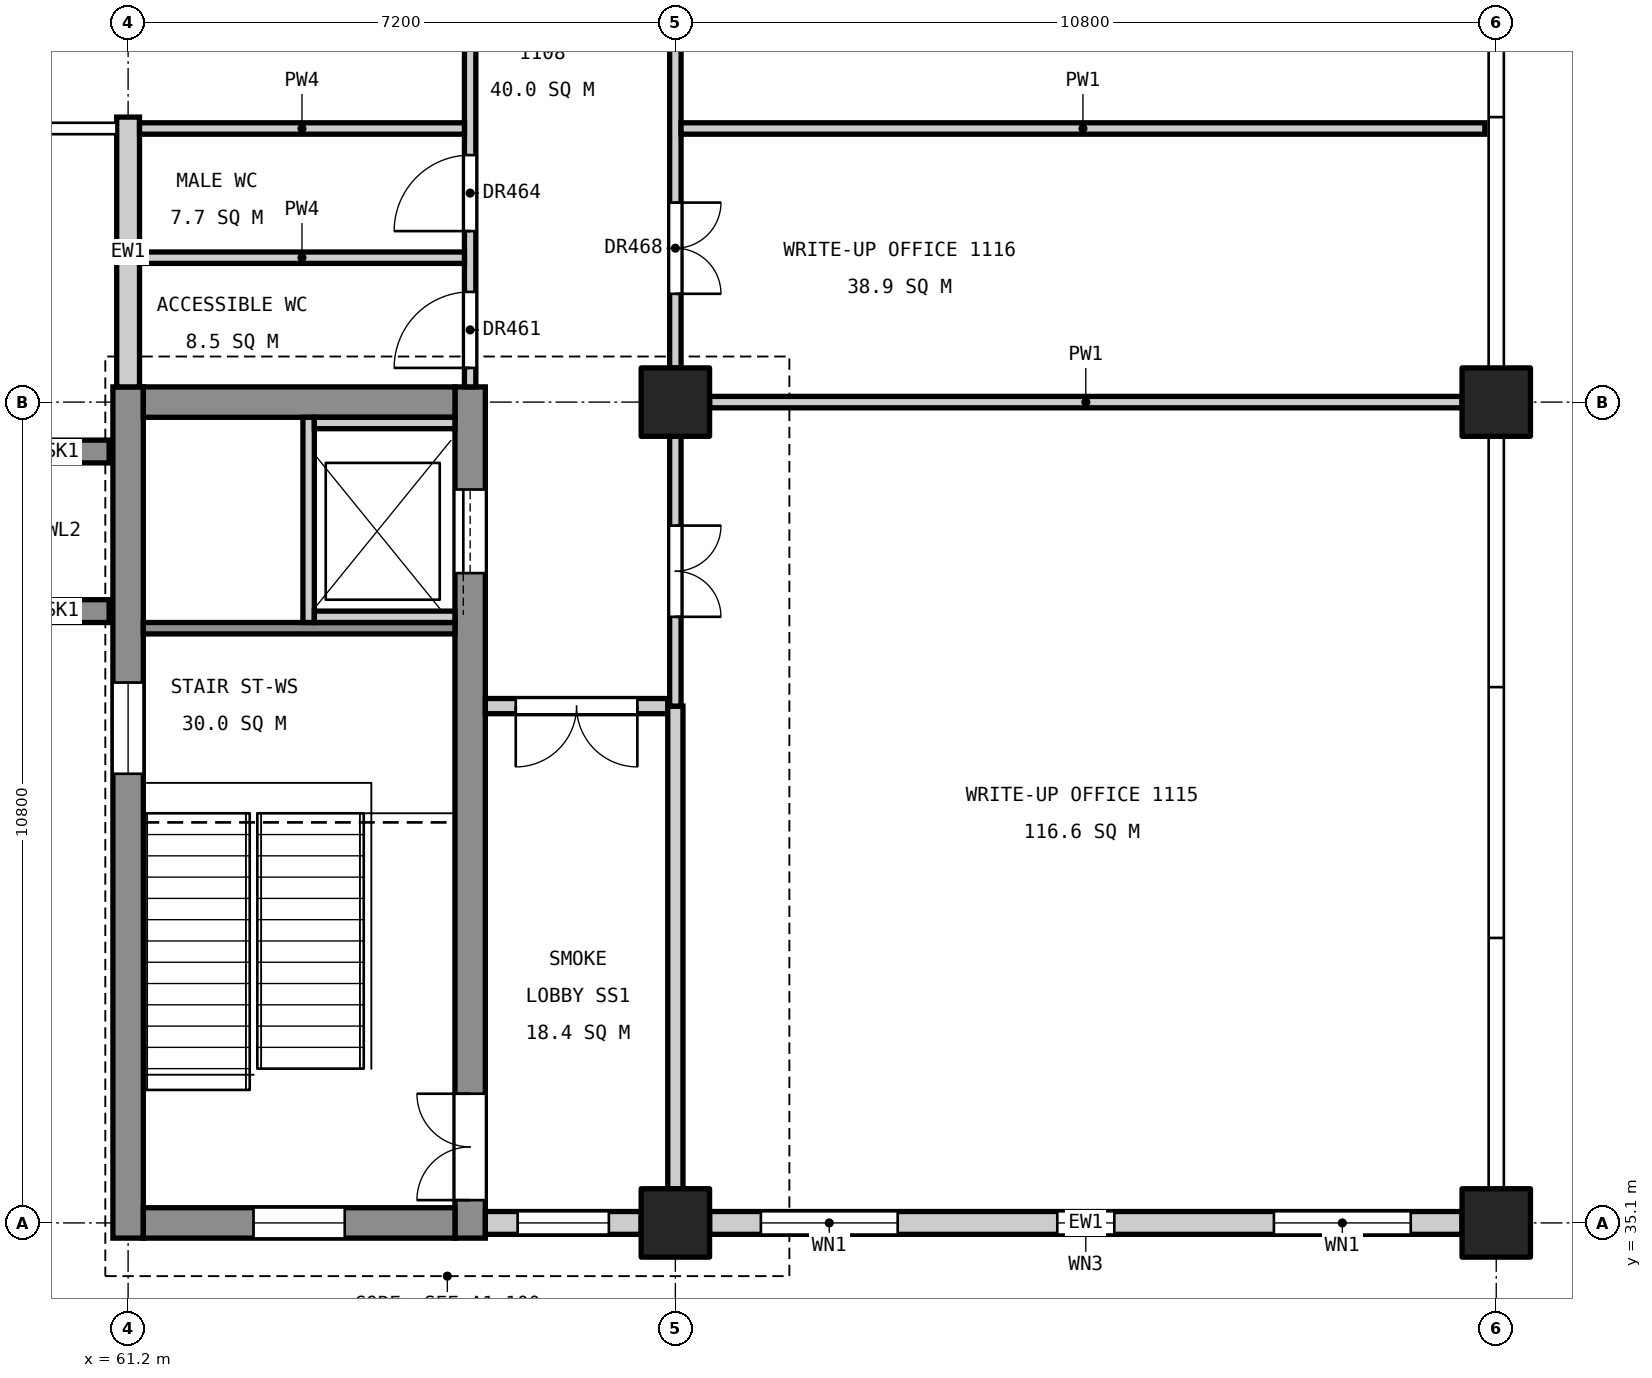
"""IFC4 building model, lengths in metres.
Left out: names, types, materials, properties, quantities, classifications, styles, units other than length and angle.
Written with IfcOpenShell. Run it as: python <this file> out.ifc"""

import sys

from ifc_helpers import new_model, si_unit, direction, frame, frame_2d, origin, origin_2d, place, context, subcontext, project, spatial, rectangle, extrude, element, fill, save


model = new_model("IFC4")
c1 = context("Model", 3, precision=1e-05, world=origin(), true_north=direction((0.0, 1.0)))
c2 = subcontext(c1, "Body", "Model", "MODEL_VIEW")
j1 = project(units=[si_unit("LENGTHUNIT", "METRE"), si_unit("PLANEANGLEUNIT", "RADIAN")], contexts=[c1])
p1 = place(None, origin())
s1 = spatial("IfcSite", under=j1, at=p1, CompositionType="ELEMENT")
p2 = place(p1, origin())
s2 = spatial("IfcBuilding", under=s1, at=p2, CompositionType="ELEMENT")
p3 = place(p2, frame((0.0, 0.0, 55.8)))
s3 = spatial("IfcBuildingStorey", under=s2, at=p3, CompositionType="ELEMENT", Elevation=55.8)
for number, where, z_axis, x_axis in (
    (1, (68.4, 35.1, 0.0), (0.0, 0.0, 1.0), (1.0, 0.0, 0.0)),
    (2, (68.4, 45.9, 0.0), (0.0, 0.0, 1.0), (1.0, 0.0, 0.0)),
    (3, (79.2, 35.1, 0.0), (0.0, 0.0, 1.0), (1.0, 0.0, 0.0)),
    (4, (79.2, 45.9, 0.0), (0.0, 0.0, 1.0), (1.0, 0.0, 0.0)),
):
    element("IfcColumn", number, at=place(p3, frame(where, z_axis=z_axis, x_axis=x_axis)), inside=s3, PredefinedType="COLUMN", context=c2, shape_type="SweptSolid", body=[
        extrude(rectangle(XDim=0.9, YDim=0.9, at=origin_2d()), origin(), (0.0, 0.0, 1.0), 4.8),
    ])
p4 = place(p3, frame((61.2, 34.9, 0.0), z_axis=(0.0, 0.0, 1.0), x_axis=(0.0, 1.0, 0.0)))
e5 = element("IfcWall", 5, at=p4, inside=s3, PredefinedType="SHEAR", context=c2, shape_type="SweptSolid", body=[
    extrude(rectangle(XDim=11.2, YDim=0.4, at=frame_2d((5.6, 0.0))), origin(), (0.0, 0.0, 1.0), 4.55),
])
p5 = place(p4, frame((6.11, 0.0, 3.4)))
e6 = element("IfcOpeningElement", 6, at=p5, cuts=e5, PredefinedType="OPENING", context=c2, shape_type="SweptSolid", body=[
    extrude(rectangle(XDim=1.2, YDim=0.9, at=frame_2d((0.6, 0.45))), frame((0.0, 0.21, 0.0), z_axis=(0.0, -1.0, 0.0), x_axis=(1.0, 0.0, 0.0)), (0.0, 0.0, 1.0), 0.42),
])
p6 = place(p3, frame((65.7, 34.9, 0.0), z_axis=(0.0, 0.0, 1.0), x_axis=(0.0, 1.0, 0.0)))
e7 = element("IfcWall", 7, at=p6, inside=s3, PredefinedType="SHEAR", context=c2, shape_type="SweptSolid", body=[
    extrude(rectangle(XDim=11.2, YDim=0.4, at=frame_2d((5.6, 0.0))), origin(), (0.0, 0.0, 1.0), 4.55),
])
p7 = place(p6, frame((0.5, 0.0, 0.0)))
e8 = element("IfcOpeningElement", 8, at=p7, cuts=e7, PredefinedType="OPENING", context=c2, shape_type="SweptSolid", body=[
    extrude(rectangle(XDim=1.4, YDim=2.1, at=frame_2d((0.7, 1.05))), frame((0.0, 0.21, 0.0), z_axis=(0.0, -1.0, 0.0), x_axis=(1.0, 0.0, 0.0)), (0.0, 0.0, 1.0), 0.42),
])
p8 = place(p6, frame((8.75, 0.0, 0.0)))
e9 = element("IfcOpeningElement", 9, at=p8, cuts=e7, PredefinedType="OPENING", context=c2, shape_type="SweptSolid", body=[
    extrude(rectangle(XDim=1.1, YDim=2.1, at=frame_2d((0.55, 1.05))), frame((0.0, 0.21, 0.0), z_axis=(0.0, -1.0, 0.0), x_axis=(1.0, 0.0, 0.0)), (0.0, 0.0, 1.0), 0.42),
])
p9 = place(p3, frame((61.4, 35.1, 0.0), z_axis=(0.0, 0.0, 1.0), x_axis=(1.0, 0.0, 0.0)))
e10 = element("IfcWall", 10, at=p9, inside=s3, PredefinedType="SHEAR", context=c2, shape_type="SweptSolid", body=[
    extrude(rectangle(XDim=4.1, YDim=0.4, at=frame_2d((2.05, 0.0))), origin(), (0.0, 0.0, 1.0), 4.55),
])
p10 = place(p9, frame((1.45, 0.0, 3.4)))
e11 = element("IfcOpeningElement", 11, at=p10, cuts=e10, PredefinedType="OPENING", context=c2, shape_type="SweptSolid", body=[
    extrude(rectangle(XDim=1.2, YDim=0.9, at=frame_2d((0.6, 0.45))), frame((0.0, 0.21, 0.0), z_axis=(0.0, -1.0, 0.0), x_axis=(1.0, 0.0, 0.0)), (0.0, 0.0, 1.0), 0.42),
])
p11 = place(p3, frame((61.4, 45.9, 0.0), z_axis=(0.0, 0.0, 1.0), x_axis=(1.0, 0.0, 0.0)))
e12 = element("IfcWall", 12, at=p11, inside=s3, PredefinedType="SHEAR", context=c2, shape_type="SweptSolid", body=[
    extrude(rectangle(XDim=4.1, YDim=0.4, at=frame_2d((2.05, 0.0))), origin(), (0.0, 0.0, 1.0), 4.55),
])
for number, where, z_axis, x_axis in (
    (13, (60.95, 43.15, 0.0), (0.0, 0.0, 1.0), (-1.0, 0.0, 0.0)),
    (14, (60.95, 45.25, 0.0), (0.0, 0.0, 1.0), (-1.0, 0.0, 0.0)),
):
    element("IfcWall", number, at=place(p3, frame(where, z_axis=z_axis, x_axis=x_axis)), inside=s3, PredefinedType="SHEAR", context=c2, shape_type="SweptSolid", body=[
        extrude(rectangle(XDim=1.25, YDim=0.3, at=frame_2d((0.625, 0.0))), origin(), (0.0, 0.0, 1.0), 4.8),
    ])
p12 = place(p3, frame((61.4, 42.925, 0.0), z_axis=(0.0, 0.0, 1.0), x_axis=(1.0, 0.0, 0.0)))
e15 = element("IfcWall", 15, at=p12, inside=s3, PredefinedType="SOLIDWALL", context=c2, shape_type="SweptSolid", body=[
    extrude(rectangle(XDim=4.1, YDim=0.15, at=frame_2d((2.05, 0.0))), origin(), (0.0, 0.0, 1.0), 4.55),
])
p13 = place(p3, frame((63.575, 43.0, 0.0), z_axis=(0.0, 0.0, 1.0), x_axis=(0.0, 1.0, 0.0)))
e16 = element("IfcWall", 16, at=p13, inside=s3, PredefinedType="SOLIDWALL", context=c2, shape_type="SweptSolid", body=[
    extrude(rectangle(XDim=2.7, YDim=0.15, at=frame_2d((1.35, 0.0))), origin(), (0.0, 0.0, 1.0), 4.8),
])
for number, where, z_axis, x_axis in (
    (17, (63.65, 43.075, 0.0), (0.0, 0.0, 1.0), (1.0, 0.0, 0.0)),
    (18, (63.65, 45.625, 0.0), (0.0, 0.0, 1.0), (1.0, 0.0, 0.0)),
):
    element("IfcWall", number, at=place(p3, frame(where, z_axis=z_axis, x_axis=x_axis)), inside=s3, PredefinedType="SOLIDWALL", context=c2, shape_type="SweptSolid", body=[
        extrude(rectangle(XDim=1.85, YDim=0.15, at=frame_2d((0.925, 0.0))), origin(), (0.0, 0.0, 1.0), 4.8),
    ])
p14 = place(p3, frame((61.2, 46.1, 0.0), z_axis=(0.0, 0.0, 1.0), x_axis=(0.0, 1.0, 0.0)))
e19 = element("IfcWall", 19, at=p14, inside=s3, PredefinedType="STANDARD", context=c2, shape_type="SweptSolid", body=[
    extrude(rectangle(XDim=3.55, YDim=0.3, at=frame_2d((1.775, 0.0))), origin(), (0.0, 0.0, 1.0), 3.65),
])
p15 = place(p3, frame((65.9, 35.1, 0.0), z_axis=(0.0, 0.0, 1.0), x_axis=(1.0, 0.0, 0.0)))
e20 = element("IfcWall", 20, at=p15, inside=s3, PredefinedType="STANDARD", context=c2, shape_type="SweptSolid", body=[
    extrude(rectangle(XDim=2.05, YDim=0.3, at=frame_2d((1.025, 0.0))), origin(), (0.0, 0.0, 1.0), 3.85),
])
p16 = place(p15, frame((0.425, 0.0, 0.9)))
e21 = element("IfcOpeningElement", 21, at=p16, cuts=e20, PredefinedType="OPENING", context=c2, shape_type="SweptSolid", body=[
    extrude(rectangle(XDim=1.2, YDim=2.4, at=frame_2d((0.6, 1.2))), frame((0.0, 0.16, 0.0), z_axis=(0.0, -1.0, 0.0), x_axis=(1.0, 0.0, 0.0)), (0.0, 0.0, 1.0), 0.32),
])
p17 = place(p3, frame((68.85, 35.1, 0.0), z_axis=(0.0, 0.0, 1.0), x_axis=(1.0, 0.0, 0.0)))
e22 = element("IfcWall", 22, at=p17, inside=s3, PredefinedType="STANDARD", context=c2, shape_type="SweptSolid", body=[
    extrude(rectangle(XDim=9.9, YDim=0.3, at=frame_2d((4.95, 0.0))), origin(), (0.0, 0.0, 1.0), 3.85),
])
p18 = place(p17, frame((0.675, 0.0, 0.9)))
e23 = element("IfcOpeningElement", 23, at=p18, cuts=e22, PredefinedType="OPENING", context=c2, shape_type="SweptSolid", body=[
    extrude(rectangle(XDim=1.8, YDim=2.4, at=frame_2d((0.9, 1.2))), frame((0.0, 0.16, 0.0), z_axis=(0.0, -1.0, 0.0), x_axis=(1.0, 0.0, 0.0)), (0.0, 0.0, 1.0), 0.32),
])
p19 = place(p17, frame((4.575, 0.0, 0.8)))
e24 = element("IfcOpeningElement", 24, at=p19, cuts=e22, PredefinedType="OPENING", context=c2, shape_type="SweptSolid", body=[
    extrude(rectangle(XDim=0.75, YDim=1.2, at=frame_2d((0.375, 0.6))), frame((0.0, 0.16, 0.0), z_axis=(0.0, -1.0, 0.0), x_axis=(1.0, 0.0, 0.0)), (0.0, 0.0, 1.0), 0.32),
])
p20 = place(p17, frame((7.425, 0.0, 0.9)))
e25 = element("IfcOpeningElement", 25, at=p20, cuts=e22, PredefinedType="OPENING", context=c2, shape_type="SweptSolid", body=[
    extrude(rectangle(XDim=1.8, YDim=2.4, at=frame_2d((0.9, 1.2))), frame((0.0, 0.16, 0.0), z_axis=(0.0, -1.0, 0.0), x_axis=(1.0, 0.0, 0.0)), (0.0, 0.0, 1.0), 0.32),
])
p21 = place(p3, frame((65.7, 46.1, 0.0), z_axis=(0.0, 0.0, 1.0), x_axis=(0.0, 1.0, 0.0)))
e26 = element("IfcWall", 26, at=p21, inside=s3, PredefinedType="PARTITIONING", context=c2, shape_type="SweptSolid", body=[
    extrude(rectangle(XDim=10.45, YDim=0.15, at=frame_2d((5.225, 0.0))), origin(), (0.0, 0.0, 1.0), 3.55),
])
p22 = place(p21, frame((0.25, 0.0, 0.0)))
e27 = element("IfcOpeningElement", 27, at=p22, cuts=e26, PredefinedType="OPENING", context=c2, shape_type="SweptSolid", body=[
    extrude(rectangle(XDim=1.0, YDim=2.1, at=frame_2d((0.5, 1.05))), frame((0.0, 0.085, 0.0), z_axis=(0.0, -1.0, 0.0), x_axis=(1.0, 0.0, 0.0)), (0.0, 0.0, 1.0), 0.17),
])
p23 = place(p21, frame((2.05, 0.0, 0.0)))
e28 = element("IfcOpeningElement", 28, at=p23, cuts=e26, PredefinedType="OPENING", context=c2, shape_type="SweptSolid", body=[
    extrude(rectangle(XDim=1.0, YDim=2.1, at=frame_2d((0.5, 1.05))), frame((0.0, 0.085, 0.0), z_axis=(0.0, -1.0, 0.0), x_axis=(1.0, 0.0, 0.0)), (0.0, 0.0, 1.0), 0.17),
])
p24 = place(p21, frame((6.5, 0.0, 0.0)))
e29 = element("IfcOpeningElement", 29, at=p24, cuts=e26, PredefinedType="OPENING", context=c2, shape_type="SweptSolid", body=[
    extrude(rectangle(XDim=1.0, YDim=2.1, at=frame_2d((0.5, 1.05))), frame((0.0, 0.085, 0.0), z_axis=(0.0, -1.0, 0.0), x_axis=(1.0, 0.0, 0.0)), (0.0, 0.0, 1.0), 0.17),
])
p25 = place(p3, frame((61.35, 47.8, 0.0), z_axis=(0.0, 0.0, 1.0), x_axis=(1.0, 0.0, 0.0)))
e30 = element("IfcWall", 30, at=p25, inside=s3, PredefinedType="PARTITIONING", context=c2, shape_type="SweptSolid", body=[
    extrude(rectangle(XDim=4.275, YDim=0.15, at=frame_2d((2.137, 0.0))), origin(), (0.0, 0.0, 1.0), 3.55),
])
p26 = place(p3, frame((61.35, 49.5, 0.0), z_axis=(0.0, 0.0, 1.0), x_axis=(1.0, 0.0, 0.0)))
e31 = element("IfcWall", 31, at=p26, inside=s3, PredefinedType="PARTITIONING", context=c2, shape_type="SweptSolid", body=[
    extrude(rectangle(XDim=4.275, YDim=0.15, at=frame_2d((2.137, 0.0))), origin(), (0.0, 0.0, 1.0), 3.85),
])
p27 = place(p3, frame((65.9, 41.9, 0.0), z_axis=(0.0, 0.0, 1.0), x_axis=(1.0, 0.0, 0.0)))
e32 = element("IfcWall", 32, at=p27, inside=s3, PredefinedType="PARTITIONING", context=c2, shape_type="SweptSolid", body=[
    extrude(rectangle(XDim=2.4, YDim=0.2, at=frame_2d((1.2, 0.0))), origin(), (0.0, 0.0, 1.0), 3.55),
])
p28 = place(p27, frame((0.4, 0.0, 0.0)))
e33 = element("IfcOpeningElement", 33, at=p28, cuts=e32, PredefinedType="OPENING", context=c2, shape_type="SweptSolid", body=[
    extrude(rectangle(XDim=1.6, YDim=2.1, at=frame_2d((0.8, 1.05))), frame((0.0, 0.11, 0.0), z_axis=(0.0, -1.0, 0.0), x_axis=(1.0, 0.0, 0.0)), (0.0, 0.0, 1.0), 0.22),
])
p29 = place(p3, frame((68.4, 35.55, 0.0), z_axis=(0.0, 0.0, 1.0), x_axis=(0.0, 1.0, 0.0)))
e34 = element("IfcWall", 34, at=p29, inside=s3, PredefinedType="PARTITIONING", context=c2, shape_type="SweptSolid", body=[
    extrude(rectangle(XDim=6.35, YDim=0.2, at=frame_2d((3.175, 0.0))), origin(), (0.0, 0.0, 1.0), 3.55),
])
p30 = place(p3, frame((68.4, 41.9, 0.0), z_axis=(0.0, 0.0, 1.0), x_axis=(0.0, 1.0, 0.0)))
e35 = element("IfcWall", 35, at=p30, inside=s3, PredefinedType="PARTITIONING", context=c2, shape_type="SweptSolid", body=[
    extrude(rectangle(XDim=3.55, YDim=0.15, at=frame_2d((1.775, 0.0))), origin(), (0.0, 0.0, 1.0), 3.55),
])
p31 = place(p30, frame((1.175, 0.0, 0.0)))
e36 = element("IfcOpeningElement", 36, at=p31, cuts=e35, PredefinedType="OPENING", context=c2, shape_type="SweptSolid", body=[
    extrude(rectangle(XDim=1.2, YDim=2.1, at=frame_2d((0.6, 1.05))), frame((0.0, 0.085, 0.0), z_axis=(0.0, -1.0, 0.0), x_axis=(1.0, 0.0, 0.0)), (0.0, 0.0, 1.0), 0.17),
])
p32 = place(p3, frame((68.4, 46.35, 0.0), z_axis=(0.0, 0.0, 1.0), x_axis=(0.0, 1.0, 0.0)))
e37 = element("IfcWall", 37, at=p32, inside=s3, PredefinedType="PARTITIONING", context=c2, shape_type="SweptSolid", body=[
    extrude(rectangle(XDim=9.9, YDim=0.15, at=frame_2d((4.95, 0.0))), origin(), (0.0, 0.0, 1.0), 3.55),
])
p33 = place(p32, frame((0.975, 0.0, 0.0)))
e38 = element("IfcOpeningElement", 38, at=p33, cuts=e37, PredefinedType="OPENING", context=c2, shape_type="SweptSolid", body=[
    extrude(rectangle(XDim=1.2, YDim=2.1, at=frame_2d((0.6, 1.05))), frame((0.0, 0.085, 0.0), z_axis=(0.0, -1.0, 0.0), x_axis=(1.0, 0.0, 0.0)), (0.0, 0.0, 1.0), 0.17),
])
p34 = place(p32, frame((4.35, 0.0, 0.0)))
e39 = element("IfcOpeningElement", 39, at=p34, cuts=e37, PredefinedType="OPENING", context=c2, shape_type="SweptSolid", body=[
    extrude(rectangle(XDim=1.2, YDim=2.1, at=frame_2d((0.6, 1.05))), frame((0.0, 0.085, 0.0), z_axis=(0.0, -1.0, 0.0), x_axis=(1.0, 0.0, 0.0)), (0.0, 0.0, 1.0), 0.17),
])
p35 = place(p32, frame((7.725, 0.0, 0.0)))
e40 = element("IfcOpeningElement", 40, at=p35, cuts=e37, PredefinedType="OPENING", context=c2, shape_type="SweptSolid", body=[
    extrude(rectangle(XDim=1.2, YDim=2.1, at=frame_2d((0.6, 1.05))), frame((0.0, 0.085, 0.0), z_axis=(0.0, -1.0, 0.0), x_axis=(1.0, 0.0, 0.0)), (0.0, 0.0, 1.0), 0.17),
])
p36 = place(p3, frame((68.85, 45.9, 0.0), z_axis=(0.0, 0.0, 1.0), x_axis=(1.0, 0.0, 0.0)))
e41 = element("IfcWall", 41, at=p36, inside=s3, PredefinedType="PARTITIONING", context=c2, shape_type="SweptSolid", body=[
    extrude(rectangle(XDim=9.9, YDim=0.15, at=frame_2d((4.95, 0.0))), origin(), (0.0, 0.0, 1.0), 3.85),
])
p37 = place(p3, frame((68.475, 49.5, 0.0), z_axis=(0.0, 0.0, 1.0), x_axis=(1.0, 0.0, 0.0)))
e42 = element("IfcWall", 42, at=p37, inside=s3, PredefinedType="PARTITIONING", context=c2, shape_type="SweptSolid", body=[
    extrude(rectangle(XDim=10.575, YDim=0.15, at=frame_2d((5.288, 0.0))), origin(), (0.0, 0.0, 1.0), 3.85),
])
p38 = place(p7, origin())
e43 = element("IfcDoor", 43, at=p38, inside=s3, OperationType="DOUBLE_DOOR_SINGLE_SWING", PredefinedType="DOOR", context=c2, shape_type="SweptSolid", body=[
    extrude(rectangle(XDim=1.4, YDim=2.1, at=frame_2d((0.7, 1.05))), frame((0.0, 0.025, 0.0), z_axis=(0.0, -1.0, 0.0), x_axis=(1.0, 0.0, 0.0)), (0.0, 0.0, 1.0), 0.05),
])
fill(e8, e43)
p39 = place(p8, origin())
e44 = element("IfcDoor", 44, at=p39, inside=s3, OperationType="SLIDING_TO_LEFT", PredefinedType="DOOR", context=c2, shape_type="SweptSolid", body=[
    extrude(rectangle(XDim=1.1, YDim=2.1, at=frame_2d((0.55, 1.05))), frame((0.0, 0.025, 0.0), z_axis=(0.0, -1.0, 0.0), x_axis=(1.0, 0.0, 0.0)), (0.0, 0.0, 1.0), 0.05),
])
fill(e9, e44)
p40 = place(p16, origin())
e45 = element("IfcWindow", 45, at=p40, inside=s3, PartitioningType="SINGLE_PANEL", PredefinedType="WINDOW", context=c2, shape_type="SweptSolid", body=[
    extrude(rectangle(XDim=1.2, YDim=2.4, at=frame_2d((0.6, 1.2))), frame((0.0, 0.03, 0.0), z_axis=(0.0, -1.0, 0.0), x_axis=(1.0, 0.0, 0.0)), (0.0, 0.0, 1.0), 0.06),
])
fill(e21, e45)
p41 = place(p18, origin())
e46 = element("IfcWindow", 46, at=p41, inside=s3, PartitioningType="SINGLE_PANEL", PredefinedType="WINDOW", context=c2, shape_type="SweptSolid", body=[
    extrude(rectangle(XDim=1.8, YDim=2.4, at=frame_2d((0.9, 1.2))), frame((0.0, 0.03, 0.0), z_axis=(0.0, -1.0, 0.0), x_axis=(1.0, 0.0, 0.0)), (0.0, 0.0, 1.0), 0.06),
])
fill(e23, e46)
p42 = place(p19, origin())
e47 = element("IfcWindow", 47, at=p42, inside=s3, PartitioningType="SINGLE_PANEL", PredefinedType="WINDOW", context=c2, shape_type="SweptSolid", body=[
    extrude(rectangle(XDim=0.75, YDim=1.2, at=frame_2d((0.375, 0.6))), frame((0.0, 0.03, 0.0), z_axis=(0.0, -1.0, 0.0), x_axis=(1.0, 0.0, 0.0)), (0.0, 0.0, 1.0), 0.06),
])
fill(e24, e47)
p43 = place(p20, origin())
e48 = element("IfcWindow", 48, at=p43, inside=s3, PartitioningType="SINGLE_PANEL", PredefinedType="WINDOW", context=c2, shape_type="SweptSolid", body=[
    extrude(rectangle(XDim=1.8, YDim=2.4, at=frame_2d((0.9, 1.2))), frame((0.0, 0.03, 0.0), z_axis=(0.0, -1.0, 0.0), x_axis=(1.0, 0.0, 0.0)), (0.0, 0.0, 1.0), 0.06),
])
fill(e25, e48)
p44 = place(p5, origin())
e49 = element("IfcWindow", 49, at=p44, inside=s3, PartitioningType="SINGLE_PANEL", PredefinedType="WINDOW", context=c2, shape_type="SweptSolid", body=[
    extrude(rectangle(XDim=1.2, YDim=0.9, at=frame_2d((0.6, 0.45))), frame((0.0, 0.03, 0.0), z_axis=(0.0, -1.0, 0.0), x_axis=(1.0, 0.0, 0.0)), (0.0, 0.0, 1.0), 0.06),
])
fill(e6, e49)
p45 = place(p10, origin())
e50 = element("IfcWindow", 50, at=p45, inside=s3, PartitioningType="SINGLE_PANEL", PredefinedType="WINDOW", context=c2, shape_type="SweptSolid", body=[
    extrude(rectangle(XDim=1.2, YDim=0.9, at=frame_2d((0.6, 0.45))), frame((0.0, 0.03, 0.0), z_axis=(0.0, -1.0, 0.0), x_axis=(1.0, 0.0, 0.0)), (0.0, 0.0, 1.0), 0.06),
])
fill(e11, e50)
p46 = place(p22, origin())
e51 = element("IfcDoor", 51, at=p46, inside=s3, OperationType="SINGLE_SWING_LEFT", PredefinedType="DOOR", context=c2, shape_type="SweptSolid", body=[
    extrude(rectangle(XDim=1.0, YDim=2.1, at=frame_2d((0.5, 1.05))), frame((0.0, 0.025, 0.0), z_axis=(0.0, -1.0, 0.0), x_axis=(1.0, 0.0, 0.0)), (0.0, 0.0, 1.0), 0.05),
])
fill(e27, e51)
p47 = place(p23, origin())
e52 = element("IfcDoor", 52, at=p47, inside=s3, OperationType="SINGLE_SWING_LEFT", PredefinedType="DOOR", context=c2, shape_type="SweptSolid", body=[
    extrude(rectangle(XDim=1.0, YDim=2.1, at=frame_2d((0.5, 1.05))), frame((0.0, 0.025, 0.0), z_axis=(0.0, -1.0, 0.0), x_axis=(1.0, 0.0, 0.0)), (0.0, 0.0, 1.0), 0.05),
])
fill(e28, e52)
p48 = place(p31, frame((1.2, 0.0, 0.0), z_axis=(0.0, 0.0, 1.0), x_axis=(-1.0, 0.0, 0.0)))
e53 = element("IfcDoor", 53, at=p48, inside=s3, OperationType="DOUBLE_DOOR_SINGLE_SWING", PredefinedType="DOOR", context=c2, shape_type="SweptSolid", body=[
    extrude(rectangle(XDim=1.2, YDim=2.1, at=frame_2d((0.6, 1.05))), frame((0.0, 0.025, 0.0), z_axis=(0.0, -1.0, 0.0), x_axis=(1.0, 0.0, 0.0)), (0.0, 0.0, 1.0), 0.05),
])
fill(e36, e53)
p49 = place(p33, frame((1.2, 0.0, 0.0), z_axis=(0.0, 0.0, 1.0), x_axis=(-1.0, 0.0, 0.0)))
e54 = element("IfcDoor", 54, at=p49, inside=s3, OperationType="DOUBLE_DOOR_SINGLE_SWING", PredefinedType="DOOR", context=c2, shape_type="SweptSolid", body=[
    extrude(rectangle(XDim=1.2, YDim=2.1, at=frame_2d((0.6, 1.05))), frame((0.0, 0.025, 0.0), z_axis=(0.0, -1.0, 0.0), x_axis=(1.0, 0.0, 0.0)), (0.0, 0.0, 1.0), 0.05),
])
fill(e38, e54)
p50 = place(p28, frame((1.6, 0.0, 0.0), z_axis=(0.0, 0.0, 1.0), x_axis=(-1.0, 0.0, 0.0)))
e55 = element("IfcDoor", 55, at=p50, inside=s3, OperationType="DOUBLE_DOOR_SINGLE_SWING", PredefinedType="DOOR", context=c2, shape_type="SweptSolid", body=[
    extrude(rectangle(XDim=1.6, YDim=2.1, at=frame_2d((0.8, 1.05))), frame((0.0, 0.025, 0.0), z_axis=(0.0, -1.0, 0.0), x_axis=(1.0, 0.0, 0.0)), (0.0, 0.0, 1.0), 0.05),
])
fill(e33, e55)
save(model, sys.argv[1])
